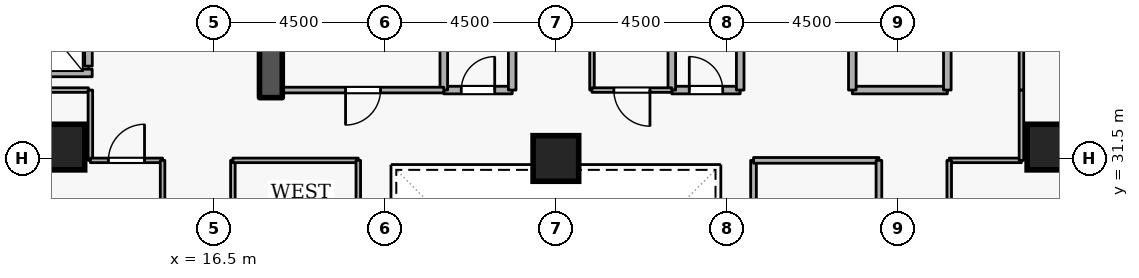
"""IFC4 building model, lengths in metres.
Left out: names, types, materials, properties, quantities, classifications, styles, units other than length and angle.
Written with IfcOpenShell. Run it as: python <this file> out.ifc"""

import sys

from ifc_helpers import new_model, si_unit, direction, frame, frame_2d, origin, origin_2d, place, context, subcontext, project, spatial, rectangle, extrude, element, fill, save


model = new_model("IFC4")
c1 = context("Model", 3, precision=1e-05, world=origin(), true_north=direction((0.0, 1.0)))
c2 = subcontext(c1, "Body", "Model", "MODEL_VIEW")
j1 = project(units=[si_unit("LENGTHUNIT", "METRE"), si_unit("PLANEANGLEUNIT", "RADIAN")], contexts=[c1])
p1 = place(None, origin())
s1 = spatial("IfcSite", under=j1, at=p1, CompositionType="ELEMENT")
p2 = place(p1, origin())
s2 = spatial("IfcBuilding", under=s1, at=p2, CompositionType="ELEMENT")
p3 = place(p2, frame((0.0, 0.0, 90.9)))
s3 = spatial("IfcBuildingStorey", under=s2, at=p3, CompositionType="ELEMENT", Elevation=90.9)
p4 = place(p3, frame((18.0, 33.1, 0.0), z_axis=(0.0, 0.0, 1.0), x_axis=(0.0, 1.0, 0.0)))
e1 = element("IfcWall", 1, at=p4, inside=s3, PredefinedType="SHEAR", context=c2, shape_type="SweptSolid", body=[
    extrude(rectangle(XDim=5.7, YDim=0.6, at=frame_2d((2.85, 0.0))), origin(), (0.0, 0.0, 1.0), 3.6),
])
for number, where, z_axis, x_axis in (
    (2, (12.5, 31.8, 0.0), (0.0, 0.0, 1.0), (1.0, 0.0, 0.0)),
    (3, (38.5, 31.8, 0.0), (0.0, 0.0, 1.0), (1.0, 0.0, 0.0)),
    (4, (25.5, 31.5, 0.0), (0.0, 0.0, 1.0), (1.0, 0.0, 0.0)),
):
    element("IfcColumn", number, at=place(p3, frame(where, z_axis=z_axis, x_axis=x_axis)), inside=s3, PredefinedType="COLUMN", context=c2, shape_type="SweptSolid", body=[
        extrude(rectangle(XDim=1.2, YDim=1.2, at=origin_2d()), origin(), (0.0, 0.0, 1.0), 3.6),
    ])
p5 = place(p3, frame((13.2, 33.93, 0.0), z_axis=(0.0, 0.0, 1.0), x_axis=(0.0, 1.0, 0.0)))
e5 = element("IfcWall", 5, at=p5, inside=s3, PredefinedType="STANDARD", context=c2, shape_type="SweptSolid", body=[
    extrude(rectangle(XDim=1.94, YDim=0.2, at=frame_2d((0.97, 0.0))), origin(), (0.0, 0.0, 1.0), 3.34),
])
p6 = place(p5, frame((0.46, 0.0, 0.0)))
e6 = element("IfcOpeningElement", 6, at=p6, cuts=e5, PredefinedType="OPENING", context=c2, shape_type="SweptSolid", body=[
    extrude(rectangle(XDim=1.02, YDim=2.06, at=frame_2d((0.51, 1.03))), frame((0.0, 0.11, 0.0), z_axis=(0.0, -1.0, 0.0), x_axis=(1.0, 0.0, 0.0)), (0.0, 0.0, 1.0), 0.22),
])
p7 = place(p3, frame((11.002, 33.75, 0.0), z_axis=(0.0, 0.0, 1.0), x_axis=(1.0, 0.0, 0.0)))
e7 = element("IfcWall", 7, at=p7, inside=s3, PredefinedType="STANDARD", context=c2, shape_type="SweptSolid", body=[
    extrude(rectangle(XDim=2.296, YDim=0.2, at=frame_2d((1.148, 0.0))), origin(), (0.0, 0.0, 1.0), 3.34),
])
p8 = place(p3, frame((33.3, 33.3, 0.0), z_axis=(0.0, 0.0, 1.0), x_axis=(1.0, 0.0, 0.0)))
e8 = element("IfcWall", 8, at=p8, inside=s3, PredefinedType="STANDARD", context=c2, shape_type="SweptSolid", body=[
    extrude(rectangle(XDim=2.5, YDim=0.2, at=frame_2d((1.25, 0.0))), origin(), (0.0, 0.0, 1.0), 3.34),
])
p9 = place(p3, frame((35.8, 33.3, 0.0), z_axis=(0.0, 0.0, 1.0), x_axis=(0.0, 1.0, 0.0)))
e9 = element("IfcWall", 9, at=p9, inside=s3, PredefinedType="STANDARD", context=c2, shape_type="SweptSolid", body=[
    extrude(rectangle(XDim=5.7, YDim=0.2, at=frame_2d((2.85, 0.0))), origin(), (0.0, 0.0, 1.0), 3.34),
])
p10 = place(p9, frame((2.275, 0.0, 0.0)))
e10 = element("IfcOpeningElement", 10, at=p10, cuts=e9, PredefinedType="OPENING", context=c2, shape_type="SweptSolid", body=[
    extrude(rectangle(XDim=1.15, YDim=2.1, at=frame_2d((0.575, 1.05))), frame((0.0, 0.11, 0.0), z_axis=(0.0, -1.0, 0.0), x_axis=(1.0, 0.0, 0.0)), (0.0, 0.0, 1.0), 0.22),
])
p11 = place(p3, frame((33.3, 35.6, 0.0), z_axis=(0.0, 0.0, 1.0), x_axis=(0.0, -1.0, 0.0)))
e11 = element("IfcWall", 11, at=p11, inside=s3, PredefinedType="STANDARD", context=c2, shape_type="SweptSolid", body=[
    extrude(rectangle(XDim=2.3, YDim=0.2, at=frame_2d((1.15, 0.0))), origin(), (0.0, 0.0, 1.0), 2.545),
])
p12 = place(p3, frame((22.55, 33.3, 0.0), z_axis=(0.0, 0.0, 1.0), x_axis=(1.0, 0.0, 0.0)))
e12 = element("IfcWall", 12, at=p12, inside=s3, PredefinedType="STANDARD", context=c2, shape_type="SweptSolid", body=[
    extrude(rectangle(XDim=1.8, YDim=0.2, at=frame_2d((0.9, 0.0))), origin(), (0.0, 0.0, 1.0), 3.34),
])
p13 = place(p12, frame((0.46, 0.0, 0.0)))
e13 = element("IfcOpeningElement", 13, at=p13, cuts=e12, PredefinedType="OPENING", context=c2, shape_type="SweptSolid", body=[
    extrude(rectangle(XDim=0.88, YDim=2.04, at=frame_2d((0.44, 1.02))), frame((0.0, 0.11, 0.0), z_axis=(0.0, -1.0, 0.0), x_axis=(1.0, 0.0, 0.0)), (0.0, 0.0, 1.0), 0.22),
])
for number, where, z_axis, x_axis in (
    (14, (24.35, 33.3, 0.0), (0.0, 0.0, 1.0), (0.0, 1.0, 0.0)),
    (15, (22.55, 35.35, 0.0), (0.0, 0.0, 1.0), (0.0, -1.0, 0.0)),
):
    element("IfcWall", number, at=place(p3, frame(where, z_axis=z_axis, x_axis=x_axis)), inside=s3, PredefinedType="STANDARD", context=c2, shape_type="SweptSolid", body=[
        extrude(rectangle(XDim=2.05, YDim=0.2, at=frame_2d((1.025, 0.0))), origin(), (0.0, 0.0, 1.0), 3.34),
    ])
p14 = place(p3, frame((28.55, 33.3, 0.0), z_axis=(0.0, 0.0, 1.0), x_axis=(1.0, 0.0, 0.0)))
e16 = element("IfcWall", 16, at=p14, inside=s3, PredefinedType="STANDARD", context=c2, shape_type="SweptSolid", body=[
    extrude(rectangle(XDim=1.8, YDim=0.2, at=frame_2d((0.9, 0.0))), origin(), (0.0, 0.0, 1.0), 3.34),
])
p15 = place(p14, frame((0.46, 0.0, 0.0)))
e17 = element("IfcOpeningElement", 17, at=p15, cuts=e16, PredefinedType="OPENING", context=c2, shape_type="SweptSolid", body=[
    extrude(rectangle(XDim=0.88, YDim=2.04, at=frame_2d((0.44, 1.02))), frame((0.0, 0.11, 0.0), z_axis=(0.0, -1.0, 0.0), x_axis=(1.0, 0.0, 0.0)), (0.0, 0.0, 1.0), 0.22),
])
for number, where, z_axis, x_axis in (
    (18, (30.35, 33.3, 0.0), (0.0, 0.0, 1.0), (0.0, 1.0, 0.0)),
    (19, (28.55, 35.35, 0.0), (0.0, 0.0, 1.0), (0.0, -1.0, 0.0)),
):
    element("IfcWall", number, at=place(p3, frame(where, z_axis=z_axis, x_axis=x_axis)), inside=s3, PredefinedType="STANDARD", context=c2, shape_type="SweptSolid", body=[
        extrude(rectangle(XDim=2.05, YDim=0.2, at=frame_2d((1.025, 0.0))), origin(), (0.0, 0.0, 1.0), 3.34),
    ])
p16 = place(p3, frame((22.55, 33.3, 0.0), z_axis=(0.0, 0.0, 1.0), x_axis=(-1.0, 0.0, 0.0)))
e20 = element("IfcWall", 20, at=p16, inside=s3, PredefinedType="PARTITIONING", context=c2, shape_type="SweptSolid", body=[
    extrude(rectangle(XDim=4.25, YDim=0.15, at=frame_2d((2.125, 0.0))), origin(), (0.0, 0.0, 1.0), 3.34),
])
p17 = place(p16, frame((1.665, 0.0, 0.0)))
e21 = element("IfcOpeningElement", 21, at=p17, cuts=e20, PredefinedType="OPENING", context=c2, shape_type="SweptSolid", body=[
    extrude(rectangle(XDim=0.92, YDim=2.08, at=frame_2d((0.46, 1.04))), frame((0.0, 0.085, 0.0), z_axis=(0.0, -1.0, 0.0), x_axis=(1.0, 0.0, 0.0)), (0.0, 0.0, 1.0), 0.17),
])
p18 = place(p3, frame((26.45, 33.3, 0.0), z_axis=(0.0, 0.0, 1.0), x_axis=(0.0, 1.0, 0.0)))
e22 = element("IfcWall", 22, at=p18, inside=s3, PredefinedType="PARTITIONING", context=c2, shape_type="SweptSolid", body=[
    extrude(rectangle(XDim=2.05, YDim=0.12, at=frame_2d((1.025, 0.0))), origin(), (0.0, 0.0, 1.0), 3.34),
])
p19 = place(p3, frame((28.55, 33.3, 0.0), z_axis=(0.0, 0.0, 1.0), x_axis=(-1.0, 0.0, 0.0)))
e23 = element("IfcWall", 23, at=p19, inside=s3, PredefinedType="PARTITIONING", context=c2, shape_type="SweptSolid", body=[
    extrude(rectangle(XDim=2.1, YDim=0.12, at=frame_2d((1.05, 0.0))), origin(), (0.0, 0.0, 1.0), 3.34),
])
p20 = place(p19, frame((0.575, 0.0, 0.0)))
e24 = element("IfcOpeningElement", 24, at=p20, cuts=e23, PredefinedType="OPENING", context=c2, shape_type="SweptSolid", body=[
    extrude(rectangle(XDim=0.95, YDim=2.1, at=frame_2d((0.475, 1.05))), frame((0.0, 0.07, 0.0), z_axis=(0.0, -1.0, 0.0), x_axis=(1.0, 0.0, 0.0)), (0.0, 0.0, 1.0), 0.14),
])
p21 = place(p3, frame((10.9, 33.3, 0.0), z_axis=(0.0, 0.0, 1.0), x_axis=(1.0, 0.0, 0.0)))
e25 = element("IfcWall", 25, at=p21, inside=s3, PredefinedType="PARTITIONING", context=c2, shape_type="SweptSolid", body=[
    extrude(rectangle(XDim=2.3, YDim=0.12, at=frame_2d((1.15, 0.0))), origin(), (0.0, 0.0, 1.0), 3.34),
])
p22 = place(p3, frame((13.25, 33.3, 0.0), z_axis=(0.0, 0.0, 1.0), x_axis=(0.0, -1.0, 0.0)))
e26 = element("IfcWall", 26, at=p22, inside=s3, PredefinedType="PARTITIONING", context=c2, shape_type="SweptSolid", body=[
    extrude(rectangle(XDim=1.85, YDim=0.12, at=frame_2d((0.925, 0.0))), origin(), (0.0, 0.0, 1.0), 3.34),
])
p23 = place(p3, frame((13.25, 31.45, 0.0), z_axis=(0.0, 0.0, 1.0), x_axis=(1.0, 0.0, 0.0)))
e27 = element("IfcWall", 27, at=p23, inside=s3, PredefinedType="PARTITIONING", context=c2, shape_type="SweptSolid", body=[
    extrude(rectangle(XDim=1.9, YDim=0.12, at=frame_2d((0.95, 0.0))), origin(), (0.0, 0.0, 1.0), 3.34),
])
p24 = place(p23, frame((0.475, 0.0, 0.0)))
e28 = element("IfcOpeningElement", 28, at=p24, cuts=e27, PredefinedType="OPENING", context=c2, shape_type="SweptSolid", body=[
    extrude(rectangle(XDim=0.95, YDim=2.1, at=frame_2d((0.475, 1.05))), frame((0.0, 0.07, 0.0), z_axis=(0.0, -1.0, 0.0), x_axis=(1.0, 0.0, 0.0)), (0.0, 0.0, 1.0), 0.14),
])
p25 = place(p3, frame((15.15, 31.45, 0.0), z_axis=(0.0, 0.0, 1.0), x_axis=(0.0, -1.0, 0.0)))
e29 = element("IfcWall", 29, at=p25, inside=s3, PredefinedType="PARTITIONING", context=c2, shape_type="SweptSolid", body=[
    extrude(rectangle(XDim=1.3, YDim=0.12, at=frame_2d((0.65, 0.0))), origin(), (0.0, 0.0, 1.0), 3.34),
])
p26 = place(p3, frame((35.85, 31.45, 0.0), z_axis=(0.0, 0.0, 1.0), x_axis=(1.0, 0.0, 0.0)))
e30 = element("IfcWall", 30, at=p26, inside=s3, PredefinedType="PARTITIONING", context=c2, shape_type="SweptSolid", body=[
    extrude(rectangle(XDim=1.9, YDim=0.12, at=frame_2d((0.95, 0.0))), origin(), (0.0, 0.0, 1.0), 3.34),
])
p27 = place(p3, frame((37.75, 31.45, 0.0), z_axis=(0.0, 0.0, 1.0), x_axis=(0.0, 1.0, 0.0)))
e31 = element("IfcWall", 31, at=p27, inside=s3, PredefinedType="PARTITIONING", context=c2, shape_type="SweptSolid", body=[
    extrude(rectangle(XDim=1.85, YDim=0.12, at=frame_2d((0.925, 0.0))), origin(), (0.0, 0.0, 1.0), 3.34),
])
p28 = place(p3, frame((37.75, 33.3, 0.0), z_axis=(0.0, 0.0, 1.0), x_axis=(0.0, 1.0, 0.0)))
e32 = element("IfcWall", 32, at=p28, inside=s3, PredefinedType="PARTITIONING", context=c2, shape_type="SweptSolid", body=[
    extrude(rectangle(XDim=9.35, YDim=0.12, at=frame_2d((4.675, 0.0))), origin(), (0.0, 0.0, 1.0), 3.34),
])
p29 = place(p28, frame((4.15, 0.0, 0.0)))
e33 = element("IfcOpeningElement", 33, at=p29, cuts=e32, PredefinedType="OPENING", context=c2, shape_type="SweptSolid", body=[
    extrude(rectangle(XDim=1.05, YDim=2.1, at=frame_2d((0.525, 1.05))), frame((0.0, 0.07, 0.0), z_axis=(0.0, -1.0, 0.0), x_axis=(1.0, 0.0, 0.0)), (0.0, 0.0, 1.0), 0.14),
])
p30 = place(p3, frame((35.85, 30.15, 0.0), z_axis=(0.0, 0.0, 1.0), x_axis=(0.0, 1.0, 0.0)))
e34 = element("IfcWall", 34, at=p30, inside=s3, PredefinedType="PARTITIONING", context=c2, shape_type="SweptSolid", body=[
    extrude(rectangle(XDim=1.3, YDim=0.12, at=frame_2d((0.65, 0.0))), origin(), (0.0, 0.0, 1.0), 3.34),
])
p31 = place(p3, frame((30.7, 22.55, 0.0), z_axis=(0.0, 0.0, 1.0), x_axis=(0.0, 1.0, 0.0)))
e35 = element("IfcWall", 35, at=p31, inside=s3, PredefinedType="PARTITIONING", context=c2, shape_type="SweptSolid", body=[
    extrude(rectangle(XDim=8.9, YDim=0.15, at=frame_2d((4.45, 0.0))), origin(), (0.0, 0.0, 1.0), 3.34),
])
p32 = place(p3, frame((30.7, 31.45, 0.0), z_axis=(0.0, 0.0, 1.0), x_axis=(1.0, 0.0, 0.0)))
e36 = element("IfcWall", 36, at=p32, inside=s3, PredefinedType="PARTITIONING", context=c2, shape_type="SweptSolid", body=[
    extrude(rectangle(XDim=3.3, YDim=0.15, at=frame_2d((1.65, 0.0))), origin(), (0.0, 0.0, 1.0), 3.34),
])
p33 = place(p3, frame((34.0, 31.45, 0.0), z_axis=(0.0, 0.0, 1.0), x_axis=(0.0, -1.0, 0.0)))
e37 = element("IfcWall", 37, at=p33, inside=s3, PredefinedType="PARTITIONING", context=c2, shape_type="SweptSolid", body=[
    extrude(rectangle(XDim=8.9, YDim=0.15, at=frame_2d((4.45, 0.0))), origin(), (0.0, 0.0, 1.0), 3.34),
])
p34 = place(p33, frame((3.8, 0.0, 0.0)))
e38 = element("IfcOpeningElement", 38, at=p34, cuts=e37, PredefinedType="OPENING", context=c2, shape_type="SweptSolid", body=[
    extrude(rectangle(XDim=1.3, YDim=2.12, at=frame_2d((0.65, 1.06))), frame((0.0, 0.085, 0.0), z_axis=(0.0, -1.0, 0.0), x_axis=(1.0, 0.0, 0.0)), (0.0, 0.0, 1.0), 0.17),
])
p35 = place(p3, frame((17.0, 22.55, 0.0), z_axis=(0.0, 0.0, 1.0), x_axis=(0.0, 1.0, 0.0)))
e39 = element("IfcWall", 39, at=p35, inside=s3, PredefinedType="PARTITIONING", context=c2, shape_type="SweptSolid", body=[
    extrude(rectangle(XDim=8.9, YDim=0.12, at=frame_2d((4.45, 0.0))), origin(), (0.0, 0.0, 1.0), 3.34),
])
p36 = place(p35, frame((3.975, 0.0, 0.0)))
e40 = element("IfcOpeningElement", 40, at=p36, cuts=e39, PredefinedType="OPENING", context=c2, shape_type="SweptSolid", body=[
    extrude(rectangle(XDim=0.95, YDim=2.1, at=frame_2d((0.475, 1.05))), frame((0.0, 0.07, 0.0), z_axis=(0.0, -1.0, 0.0), x_axis=(1.0, 0.0, 0.0)), (0.0, 0.0, 1.0), 0.14),
])
p37 = place(p3, frame((17.0, 31.45, 0.0), z_axis=(0.0, 0.0, 1.0), x_axis=(1.0, 0.0, 0.0)))
e41 = element("IfcWall", 41, at=p37, inside=s3, PredefinedType="PARTITIONING", context=c2, shape_type="SweptSolid", body=[
    extrude(rectangle(XDim=3.3, YDim=0.12, at=frame_2d((1.65, 0.0))), origin(), (0.0, 0.0, 1.0), 3.34),
])
p38 = place(p3, frame((20.3, 31.45, 0.0), z_axis=(0.0, 0.0, 1.0), x_axis=(0.0, -1.0, 0.0)))
e42 = element("IfcWall", 42, at=p38, inside=s3, PredefinedType="PARTITIONING", context=c2, shape_type="SweptSolid", body=[
    extrude(rectangle(XDim=8.9, YDim=0.12, at=frame_2d((4.45, 0.0))), origin(), (0.0, 0.0, 1.0), 3.34),
])
p39 = place(p13, origin())
e43 = element("IfcDoor", 43, at=p39, inside=s3, OperationType="SINGLE_SWING_RIGHT", PredefinedType="DOOR", context=c2, shape_type="SweptSolid", body=[
    extrude(rectangle(XDim=0.88, YDim=2.04, at=frame_2d((0.44, 1.02))), frame((0.0, 0.025, 0.0), z_axis=(0.0, -1.0, 0.0), x_axis=(1.0, 0.0, 0.0)), (0.0, 0.0, 1.0), 0.05),
])
fill(e13, e43)
p40 = place(p15, origin())
e44 = element("IfcDoor", 44, at=p40, inside=s3, OperationType="SINGLE_SWING_LEFT", PredefinedType="DOOR", context=c2, shape_type="SweptSolid", body=[
    extrude(rectangle(XDim=0.88, YDim=2.04, at=frame_2d((0.44, 1.02))), frame((0.0, 0.025, 0.0), z_axis=(0.0, -1.0, 0.0), x_axis=(1.0, 0.0, 0.0)), (0.0, 0.0, 1.0), 0.05),
])
fill(e17, e44)
p41 = place(p17, origin())
e45 = element("IfcDoor", 45, at=p41, inside=s3, OperationType="SINGLE_SWING_RIGHT", PredefinedType="DOOR", context=c2, shape_type="SweptSolid", body=[
    extrude(rectangle(XDim=0.92, YDim=2.08, at=frame_2d((0.46, 1.04))), frame((0.0, 0.025, 0.0), z_axis=(0.0, -1.0, 0.0), x_axis=(1.0, 0.0, 0.0)), (0.0, 0.0, 1.0), 0.05),
])
fill(e21, e45)
p42 = place(p20, origin())
e46 = element("IfcDoor", 46, at=p42, inside=s3, OperationType="SINGLE_SWING_LEFT", PredefinedType="DOOR", context=c2, shape_type="SweptSolid", body=[
    extrude(rectangle(XDim=0.95, YDim=2.1, at=frame_2d((0.475, 1.05))), frame((0.0, 0.025, 0.0), z_axis=(0.0, -1.0, 0.0), x_axis=(1.0, 0.0, 0.0)), (0.0, 0.0, 1.0), 0.05),
])
fill(e24, e46)
p43 = place(p24, origin())
e47 = element("IfcDoor", 47, at=p43, inside=s3, OperationType="SINGLE_SWING_RIGHT", PredefinedType="DOOR", context=c2, shape_type="SweptSolid", body=[
    extrude(rectangle(XDim=0.95, YDim=2.1, at=frame_2d((0.475, 1.05))), frame((0.0, 0.025, 0.0), z_axis=(0.0, -1.0, 0.0), x_axis=(1.0, 0.0, 0.0)), (0.0, 0.0, 1.0), 0.05),
])
fill(e28, e47)
save(model, sys.argv[1])
